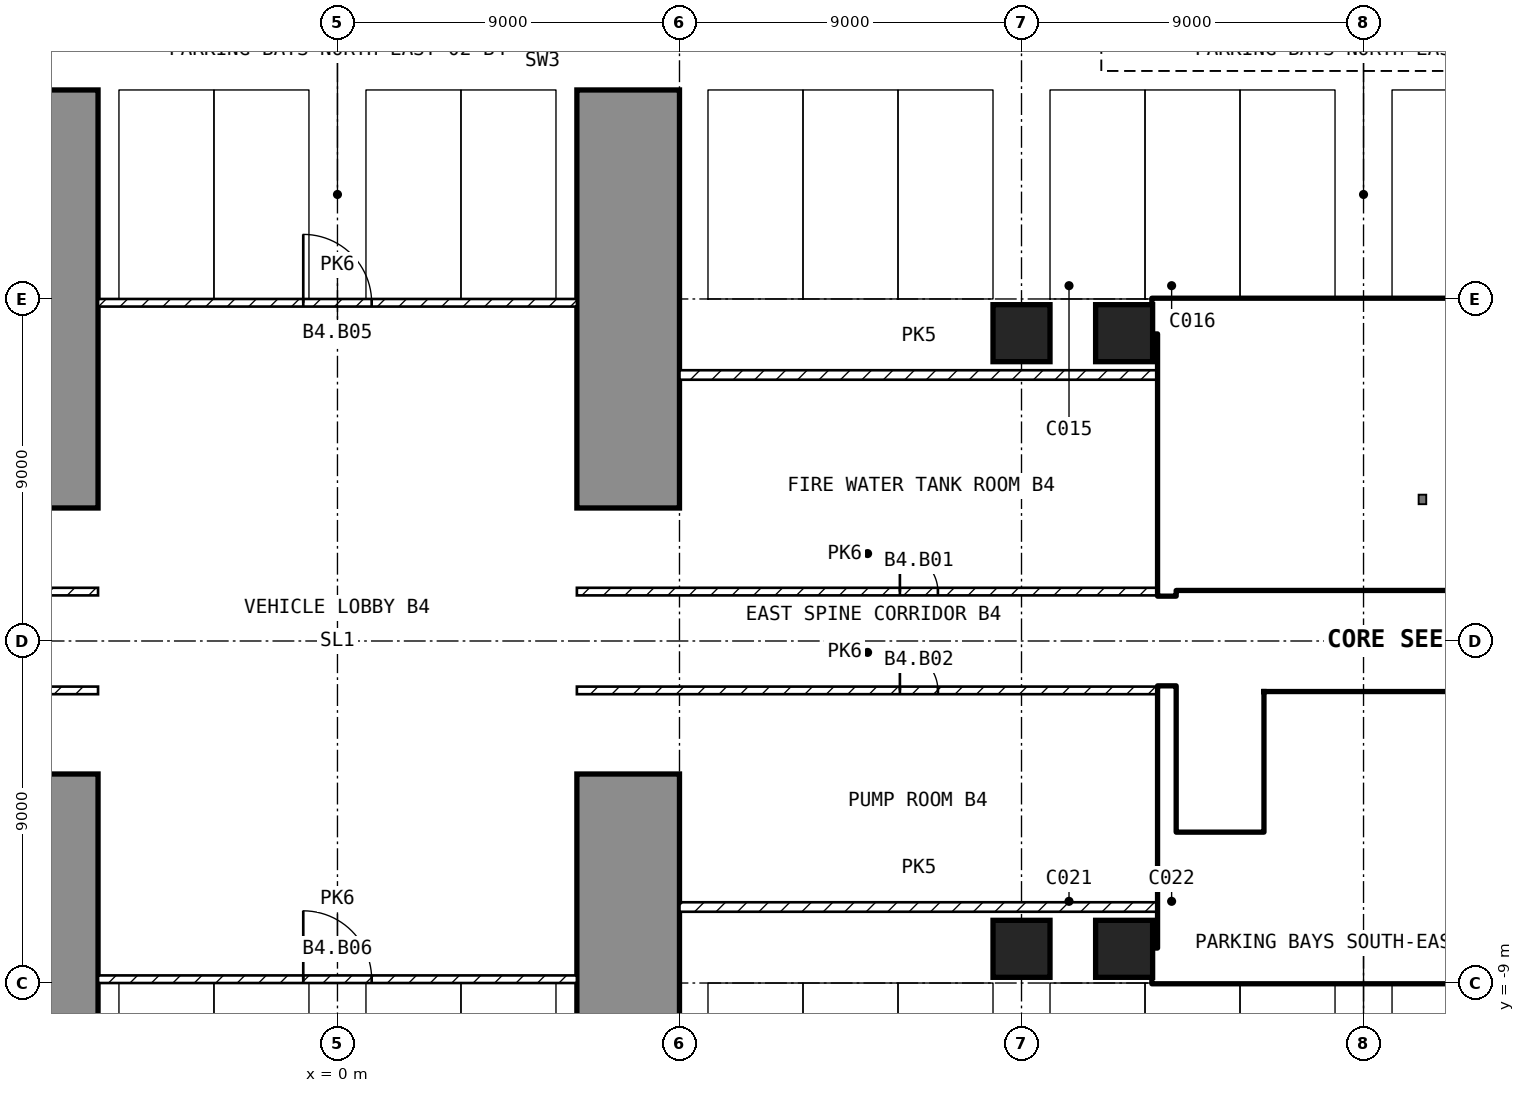
"""IFC4 building model, lengths in metres.
Left out: names, types, materials, properties, quantities, classifications, styles, units other than length and angle.
Written with IfcOpenShell. Run it as: python <this file> out.ifc"""

import sys

from ifc_helpers import new_model, si_unit, direction, frame, frame_2d, origin, origin_2d, place, context, subcontext, project, spatial, polyline, rectangle, outline, extrude, element, fill, save


model = new_model("IFC4")
c1 = context("Model", 3, precision=1e-05, world=origin(), true_north=direction((0.0, 1.0)))
c2 = subcontext(c1, "Body", "Model", "MODEL_VIEW")
j1 = project(units=[si_unit("LENGTHUNIT", "METRE"), si_unit("PLANEANGLEUNIT", "RADIAN")], contexts=[c1])
p1 = place(None, origin())
s1 = spatial("IfcSite", under=j1, at=p1, CompositionType="ELEMENT")
p2 = place(p1, origin())
s2 = spatial("IfcBuilding", under=s1, at=p2, CompositionType="ELEMENT")
p3 = place(p2, frame((0.0, 0.0, -17.1)))
s3 = spatial("IfcBuildingStorey", under=s2, at=p3, CompositionType="ELEMENT", Elevation=-17.1)
for number, where, z_axis, x_axis in (
    (1, (18.0, -8.1, 0.0), (0.0, 0.0, 1.0), (1.0, 0.0, 0.0)),
    (2, (18.0, 8.1, 0.0), (0.0, 0.0, 1.0), (1.0, 0.0, 0.0)),
    (3, (20.7, -8.1, 0.0), (0.0, 0.0, 1.0), (1.0, 0.0, 0.0)),
    (4, (20.7, 8.1, 0.0), (0.0, 0.0, 1.0), (1.0, 0.0, 0.0)),
):
    element("IfcColumn", number, at=place(p3, frame(where, z_axis=z_axis, x_axis=x_axis)), inside=s3, PredefinedType="COLUMN", context=c2, shape_type="SweptSolid", body=[
        extrude(rectangle(XDim=1.5, YDim=1.5, at=origin_2d()), origin(), (0.0, 0.0, 1.0), 3.9),
    ])
p4 = place(p3, frame((6.3, -27.0, 0.0), z_axis=(1.0, 0.0, 0.0), x_axis=(0.0, 1.0, 0.0)))
e5 = element("IfcWall", 5, at=p4, inside=s3, PredefinedType="SOLIDWALL", context=c2, shape_type="SweptSolid", body=[
    extrude(outline(polyline([(0.0, 0.0), (5.5, 0.0), (5.5, 3.0), (12.5, 3.0), (12.5, 0.0), (23.5, 0.0), (23.5, 3.9), (0.0, 3.9), (0.0, 0.0)])), origin(), (0.0, 0.0, 1.0), 2.7),
])
p5 = place(p3, frame((6.3, 3.5, 0.0), z_axis=(1.0, 0.0, 0.0), x_axis=(0.0, 1.0, 0.0)))
e6 = element("IfcWall", 6, at=p5, inside=s3, PredefinedType="SOLIDWALL", context=c2, shape_type="SweptSolid", body=[
    extrude(outline(polyline([(0.0, 0.0), (11.0, 0.0), (11.0, 3.0), (18.0, 3.0), (18.0, 0.0), (23.5, 0.0), (23.5, 3.9), (0.0, 3.9), (0.0, 0.0)])), origin(), (0.0, 0.0, 1.0), 2.7),
])
p6 = place(p3, frame((-9.0, -27.0, 0.0), z_axis=(1.0, 0.0, 0.0), x_axis=(0.0, 1.0, 0.0)))
e7 = element("IfcWall", 7, at=p6, inside=s3, PredefinedType="SOLIDWALL", context=c2, shape_type="SweptSolid", body=[
    extrude(outline(polyline([(0.0, 0.0), (5.5, 0.0), (5.5, 3.0), (12.5, 3.0), (12.5, 0.0), (23.5, 0.0), (23.5, 3.9), (0.0, 3.9), (0.0, 0.0)])), origin(), (0.0, 0.0, 1.0), 2.7),
])
p7 = place(p3, frame((-9.0, 3.5, 0.0), z_axis=(1.0, 0.0, 0.0), x_axis=(0.0, 1.0, 0.0)))
e8 = element("IfcWall", 8, at=p7, inside=s3, PredefinedType="SOLIDWALL", context=c2, shape_type="SweptSolid", body=[
    extrude(outline(polyline([(0.0, 0.0), (11.0, 0.0), (11.0, 3.0), (18.0, 3.0), (18.0, 0.0), (23.5, 0.0), (23.5, 3.9), (0.0, 3.9), (0.0, 0.0)])), origin(), (0.0, 0.0, 1.0), 2.7),
])
p8 = place(p3, frame((21.45, -8.55, 0.0), z_axis=(0.0, 0.0, 1.0), x_axis=(1.0, 0.0, 0.0)))
e9 = element("IfcWall", 9, at=p8, inside=s3, PredefinedType="SHEAR", context=c2, shape_type="SweptSolid", body=[
    extrude(rectangle(XDim=10.95, YDim=0.9, at=frame_2d((5.475, 0.0))), origin(), (0.0, 0.0, 1.0), 3.9),
])
p9 = place(p3, frame((21.45, 8.55, 0.0), z_axis=(0.0, 0.0, 1.0), x_axis=(1.0, 0.0, 0.0)))
e10 = element("IfcWall", 10, at=p9, inside=s3, PredefinedType="SHEAR", context=c2, shape_type="SweptSolid", body=[
    extrude(rectangle(XDim=10.05, YDim=0.9, at=frame_2d((5.025, 0.0))), origin(), (0.0, 0.0, 1.0), 3.9),
])
for number, where, z_axis, x_axis in (
    (11, (21.825, -8.1, 0.0), (0.0, 0.0, 1.0), (0.0, 1.0, 0.0)),
    (12, (21.825, 1.2, 0.0), (0.0, 0.0, 1.0), (0.0, 1.0, 0.0)),
):
    element("IfcWall", number, at=place(p3, frame(where, z_axis=z_axis, x_axis=x_axis)), inside=s3, PredefinedType="SHEAR", context=c2, shape_type="SweptSolid", body=[
        extrude(rectangle(XDim=6.9, YDim=0.45, at=frame_2d((3.45, 0.0))), origin(), (0.0, 0.0, 1.0), 3.9),
    ])
p10 = place(p3, frame((22.05, 1.45, 0.0), z_axis=(0.0, 0.0, 1.0), x_axis=(1.0, 0.0, 0.0)))
e13 = element("IfcWall", 13, at=p10, inside=s3, PredefinedType="SOLIDWALL", context=c2, shape_type="SweptSolid", body=[
    extrude(rectangle(XDim=13.05, YDim=0.2, at=frame_2d((6.525, 0.0))), origin(), (0.0, 0.0, 1.0), 3.9),
])
p11 = place(p10, frame((0.75, 0.0, 0.0)))
e14 = element("IfcOpeningElement", 14, at=p11, cuts=e13, PredefinedType="OPENING", context=c2, shape_type="SweptSolid", body=[
    extrude(rectangle(XDim=1.0, YDim=2.1, at=frame_2d((0.5, 1.05))), frame((0.0, 0.11, 0.0), z_axis=(0.0, -1.0, 0.0), x_axis=(1.0, 0.0, 0.0)), (0.0, 0.0, 1.0), 0.22),
])
p12 = place(p10, frame((3.25, 0.0, 0.0)))
e15 = element("IfcOpeningElement", 15, at=p12, cuts=e13, PredefinedType="OPENING", context=c2, shape_type="SweptSolid", body=[
    extrude(rectangle(XDim=1.0, YDim=2.1, at=frame_2d((0.5, 1.05))), frame((0.0, 0.11, 0.0), z_axis=(0.0, -1.0, 0.0), x_axis=(1.0, 0.0, 0.0)), (0.0, 0.0, 1.0), 0.22),
])
p13 = place(p10, frame((10.0, 0.0, 0.0)))
e16 = element("IfcOpeningElement", 16, at=p13, cuts=e13, PredefinedType="OPENING", context=c2, shape_type="SweptSolid", body=[
    extrude(rectangle(XDim=0.9, YDim=2.1, at=frame_2d((0.45, 1.05))), frame((0.0, 0.11, 0.0), z_axis=(0.0, -1.0, 0.0), x_axis=(1.0, 0.0, 0.0)), (0.0, 0.0, 1.0), 0.22),
])
p14 = place(p3, frame((24.5, -5.05, 0.0), z_axis=(0.0, 0.0, 1.0), x_axis=(0.0, 1.0, 0.0)))
e17 = element("IfcWall", 17, at=p14, inside=s3, PredefinedType="SOLIDWALL", context=c2, shape_type="SweptSolid", body=[
    extrude(rectangle(XDim=3.7, YDim=0.2, at=frame_2d((1.85, 0.0))), origin(), (0.0, 0.0, 1.0), 3.9),
])
p15 = place(p14, frame((0.1, 0.0, 0.0)))
e18 = element("IfcOpeningElement", 18, at=p15, cuts=e17, PredefinedType="OPENING", context=c2, shape_type="SweptSolid", body=[
    extrude(rectangle(XDim=0.8, YDim=2.1, at=frame_2d((0.4, 1.05))), frame((0.0, 0.11, 0.0), z_axis=(0.0, -1.0, 0.0), x_axis=(1.0, 0.0, 0.0)), (0.0, 0.0, 1.0), 0.22),
])
p16 = place(p3, frame((22.05, 5.15, 0.0), z_axis=(0.0, 0.0, 1.0), x_axis=(1.0, 0.0, 0.0)))
e19 = element("IfcWall", 19, at=p16, inside=s3, PredefinedType="SOLIDWALL", context=c2, shape_type="SweptSolid", body=[
    extrude(rectangle(XDim=6.3, YDim=0.2, at=frame_2d((3.15, 0.0))), origin(), (0.0, 0.0, 1.0), 3.9),
])
p17 = place(p16, frame((0.2, 0.0, 0.0)))
e20 = element("IfcOpeningElement", 20, at=p17, cuts=e19, PredefinedType="OPENING", context=c2, shape_type="SweptSolid", body=[
    extrude(rectangle(XDim=1.0, YDim=2.1, at=frame_2d((0.5, 1.05))), frame((0.0, 0.11, 0.0), z_axis=(0.0, -1.0, 0.0), x_axis=(1.0, 0.0, 0.0)), (0.0, 0.0, 1.0), 0.22),
])
p18 = place(p3, frame((22.05, -5.15, 0.0), z_axis=(0.0, 0.0, 1.0), x_axis=(1.0, 0.0, 0.0)))
e21 = element("IfcWall", 21, at=p18, inside=s3, PredefinedType="SOLIDWALL", context=c2, shape_type="SweptSolid", body=[
    extrude(rectangle(XDim=6.3, YDim=0.2, at=frame_2d((3.15, 0.0))), origin(), (0.0, 0.0, 1.0), 3.9),
])
p19 = place(p18, frame((0.2, 0.0, 0.0)))
e22 = element("IfcOpeningElement", 22, at=p19, cuts=e21, PredefinedType="OPENING", context=c2, shape_type="SweptSolid", body=[
    extrude(rectangle(XDim=1.0, YDim=2.1, at=frame_2d((0.5, 1.05))), frame((0.0, 0.11, 0.0), z_axis=(0.0, -1.0, 0.0), x_axis=(1.0, 0.0, 0.0)), (0.0, 0.0, 1.0), 0.22),
])
for number, where, z_axis, x_axis in (
    (23, (28.25, 5.25, 0.0), (0.0, 0.0, 1.0), (0.0, 1.0, 0.0)),
    (24, (28.25, -8.1, 0.0), (0.0, 0.0, 1.0), (0.0, 1.0, 0.0)),
):
    element("IfcWall", number, at=place(p3, frame(where, z_axis=z_axis, x_axis=x_axis)), inside=s3, PredefinedType="SOLIDWALL", context=c2, shape_type="SweptSolid", body=[
        extrude(rectangle(XDim=2.85, YDim=0.2, at=frame_2d((1.425, 0.0))), origin(), (0.0, 0.0, 1.0), 3.9),
    ])
p20 = place(p3, frame((24.6, -1.45, 0.0), z_axis=(0.0, 0.0, 1.0), x_axis=(1.0, 0.0, 0.0)))
e25 = element("IfcWall", 25, at=p20, inside=s3, PredefinedType="SOLIDWALL", context=c2, shape_type="SweptSolid", body=[
    extrude(rectangle(XDim=10.5, YDim=0.2, at=frame_2d((5.25, 0.0))), origin(), (0.0, 0.0, 1.0), 3.9),
])
p21 = place(p20, frame((2.45, 0.0, 0.0)))
e26 = element("IfcOpeningElement", 26, at=p21, cuts=e25, PredefinedType="OPENING", context=c2, shape_type="SweptSolid", body=[
    extrude(rectangle(XDim=0.9, YDim=2.1, at=frame_2d((0.45, 1.05))), frame((0.0, 0.11, 0.0), z_axis=(0.0, -1.0, 0.0), x_axis=(1.0, 0.0, 0.0)), (0.0, 0.0, 1.0), 0.22),
])
p22 = place(p20, frame((6.25, 0.0, 0.0)))
e27 = element("IfcOpeningElement", 27, at=p22, cuts=e25, PredefinedType="OPENING", context=c2, shape_type="SweptSolid", body=[
    extrude(rectangle(XDim=0.9, YDim=2.1, at=frame_2d((0.45, 1.05))), frame((0.0, 0.11, 0.0), z_axis=(0.0, -1.0, 0.0), x_axis=(1.0, 0.0, 0.0)), (0.0, 0.0, 1.0), 0.22),
])
p23 = place(p20, frame((8.575, 0.0, 0.0)))
e28 = element("IfcOpeningElement", 28, at=p23, cuts=e25, PredefinedType="OPENING", context=c2, shape_type="SweptSolid", body=[
    extrude(rectangle(XDim=0.9, YDim=2.1, at=frame_2d((0.45, 1.05))), frame((0.0, 0.11, 0.0), z_axis=(0.0, -1.0, 0.0), x_axis=(1.0, 0.0, 0.0)), (0.0, 0.0, 1.0), 0.22),
])
p24 = place(p3, frame((27.2, 3.95, 0.0), z_axis=(0.0, 0.0, 1.0), x_axis=(1.0, 0.0, 0.0)))
e29 = element("IfcWall", 29, at=p24, inside=s3, PredefinedType="SOLIDWALL", context=c2, shape_type="SweptSolid", body=[
    extrude(rectangle(XDim=7.9, YDim=0.2, at=frame_2d((3.95, 0.0))), origin(), (0.0, 0.0, 1.0), 3.9),
])
p25 = place(p3, frame((24.6, -3.95, 0.0), z_axis=(0.0, 0.0, 1.0), x_axis=(1.0, 0.0, 0.0)))
e30 = element("IfcWall", 30, at=p25, inside=s3, PredefinedType="SOLIDWALL", context=c2, shape_type="SweptSolid", body=[
    extrude(rectangle(XDim=10.5, YDim=0.2, at=frame_2d((5.25, 0.0))), origin(), (0.0, 0.0, 1.0), 3.9),
])
p26 = place(p3, frame((27.1, 1.55, 0.0), z_axis=(0.0, 0.0, 1.0), x_axis=(0.0, 1.0, 0.0)))
e31 = element("IfcWall", 31, at=p26, inside=s3, PredefinedType="SOLIDWALL", context=c2, shape_type="SweptSolid", body=[
    extrude(rectangle(XDim=3.5, YDim=0.2, at=frame_2d((1.75, 0.0))), origin(), (0.0, 0.0, 1.0), 3.9),
])
p27 = place(p26, frame((0.6, 0.0, 0.0)))
e32 = element("IfcOpeningElement", 32, at=p27, cuts=e31, PredefinedType="OPENING", context=c2, shape_type="SweptSolid", body=[
    extrude(rectangle(XDim=1.1, YDim=2.1, at=frame_2d((0.55, 1.05))), frame((0.0, 0.11, 0.0), z_axis=(0.0, -1.0, 0.0), x_axis=(1.0, 0.0, 0.0)), (0.0, 0.0, 1.0), 0.22),
])
p28 = place(p26, frame((2.6, 0.0, 0.0)))
e33 = element("IfcOpeningElement", 33, at=p28, cuts=e31, PredefinedType="OPENING", context=c2, shape_type="SweptSolid", body=[
    extrude(rectangle(XDim=0.8, YDim=2.1, at=frame_2d((0.4, 1.05))), frame((0.0, 0.11, 0.0), z_axis=(0.0, -1.0, 0.0), x_axis=(1.0, 0.0, 0.0)), (0.0, 0.0, 1.0), 0.22),
])
p29 = place(p3, frame((6.3, 1.3, 0.0), z_axis=(0.0, 0.0, 1.0), x_axis=(1.0, 0.0, 0.0)))
e34 = element("IfcWall", 34, at=p29, inside=s3, PredefinedType="PARTITIONING", context=c2, shape_type="SweptSolid", body=[
    extrude(rectangle(XDim=15.3, YDim=0.2, at=frame_2d((7.65, 0.0))), origin(), (0.0, 0.0, 1.0), 3.9),
])
p30 = place(p29, frame((8.5, 0.0, 0.0)))
e35 = element("IfcOpeningElement", 35, at=p30, cuts=e34, PredefinedType="OPENING", context=c2, shape_type="SweptSolid", body=[
    extrude(rectangle(XDim=1.0, YDim=2.1, at=frame_2d((0.5, 1.05))), frame((0.0, 0.11, 0.0), z_axis=(0.0, -1.0, 0.0), x_axis=(1.0, 0.0, 0.0)), (0.0, 0.0, 1.0), 0.22),
])
p31 = place(p3, frame((9.0, 7.0, 0.0), z_axis=(0.0, 0.0, 1.0), x_axis=(1.0, 0.0, 0.0)))
e36 = element("IfcWall", 36, at=p31, inside=s3, PredefinedType="SOLIDWALL", context=c2, shape_type="SweptSolid", body=[
    extrude(rectangle(XDim=12.6, YDim=0.25, at=frame_2d((6.3, 0.0))), origin(), (0.0, 0.0, 1.0), 3.9),
])
p32 = place(p3, frame((6.3, -1.3, 0.0), z_axis=(0.0, 0.0, 1.0), x_axis=(1.0, 0.0, 0.0)))
e37 = element("IfcWall", 37, at=p32, inside=s3, PredefinedType="PARTITIONING", context=c2, shape_type="SweptSolid", body=[
    extrude(rectangle(XDim=15.3, YDim=0.2, at=frame_2d((7.65, 0.0))), origin(), (0.0, 0.0, 1.0), 3.9),
])
p33 = place(p32, frame((8.5, 0.0, 0.0)))
e38 = element("IfcOpeningElement", 38, at=p33, cuts=e37, PredefinedType="OPENING", context=c2, shape_type="SweptSolid", body=[
    extrude(rectangle(XDim=1.0, YDim=2.1, at=frame_2d((0.5, 1.05))), frame((0.0, 0.11, 0.0), z_axis=(0.0, -1.0, 0.0), x_axis=(1.0, 0.0, 0.0)), (0.0, 0.0, 1.0), 0.22),
])
p34 = place(p3, frame((9.0, -7.0, 0.0), z_axis=(0.0, 0.0, 1.0), x_axis=(1.0, 0.0, 0.0)))
e39 = element("IfcWall", 39, at=p34, inside=s3, PredefinedType="SOLIDWALL", context=c2, shape_type="SweptSolid", body=[
    extrude(rectangle(XDim=12.6, YDim=0.25, at=frame_2d((6.3, 0.0))), origin(), (0.0, 0.0, 1.0), 3.9),
])
p35 = place(p3, frame((-6.3, 1.3, 0.0), z_axis=(0.0, 0.0, 1.0), x_axis=(-1.0, 0.0, 0.0)))
e40 = element("IfcWall", 40, at=p35, inside=s3, PredefinedType="PARTITIONING", context=c2, shape_type="SweptSolid", body=[
    extrude(rectangle(XDim=15.3, YDim=0.2, at=frame_2d((7.65, 0.0))), origin(), (0.0, 0.0, 1.0), 3.9),
])
p36 = place(p35, frame((8.5, 0.0, 0.0)))
e41 = element("IfcOpeningElement", 41, at=p36, cuts=e40, PredefinedType="OPENING", context=c2, shape_type="SweptSolid", body=[
    extrude(rectangle(XDim=1.0, YDim=2.1, at=frame_2d((0.5, 1.05))), frame((0.0, 0.11, 0.0), z_axis=(0.0, -1.0, 0.0), x_axis=(1.0, 0.0, 0.0)), (0.0, 0.0, 1.0), 0.22),
])
p37 = place(p3, frame((-6.3, -1.3, 0.0), z_axis=(0.0, 0.0, 1.0), x_axis=(-1.0, 0.0, 0.0)))
e42 = element("IfcWall", 42, at=p37, inside=s3, PredefinedType="PARTITIONING", context=c2, shape_type="SweptSolid", body=[
    extrude(rectangle(XDim=15.3, YDim=0.2, at=frame_2d((7.65, 0.0))), origin(), (0.0, 0.0, 1.0), 3.9),
])
p38 = place(p37, frame((8.5, 0.0, 0.0)))
e43 = element("IfcOpeningElement", 43, at=p38, cuts=e42, PredefinedType="OPENING", context=c2, shape_type="SweptSolid", body=[
    extrude(rectangle(XDim=1.0, YDim=2.1, at=frame_2d((0.5, 1.05))), frame((0.0, 0.11, 0.0), z_axis=(0.0, -1.0, 0.0), x_axis=(1.0, 0.0, 0.0)), (0.0, 0.0, 1.0), 0.22),
])
p39 = place(p3, frame((-6.3, 8.9, 0.0), z_axis=(0.0, 0.0, 1.0), x_axis=(1.0, 0.0, 0.0)))
e44 = element("IfcWall", 44, at=p39, inside=s3, PredefinedType="PARTITIONING", context=c2, shape_type="SweptSolid", body=[
    extrude(rectangle(XDim=12.6, YDim=0.2, at=frame_2d((6.3, 0.0))), origin(), (0.0, 0.0, 1.0), 3.9),
])
p40 = place(p39, frame((5.4, 0.0, 0.0)))
e45 = element("IfcOpeningElement", 45, at=p40, cuts=e44, PredefinedType="OPENING", context=c2, shape_type="SweptSolid", body=[
    extrude(rectangle(XDim=1.8, YDim=2.1, at=frame_2d((0.9, 1.05))), frame((0.0, 0.11, 0.0), z_axis=(0.0, -1.0, 0.0), x_axis=(1.0, 0.0, 0.0)), (0.0, 0.0, 1.0), 0.22),
])
p41 = place(p3, frame((-6.3, -8.9, 0.0), z_axis=(0.0, 0.0, 1.0), x_axis=(1.0, 0.0, 0.0)))
e46 = element("IfcWall", 46, at=p41, inside=s3, PredefinedType="PARTITIONING", context=c2, shape_type="SweptSolid", body=[
    extrude(rectangle(XDim=12.6, YDim=0.2, at=frame_2d((6.3, 0.0))), origin(), (0.0, 0.0, 1.0), 3.9),
])
p42 = place(p41, frame((5.4, 0.0, 0.0)))
e47 = element("IfcOpeningElement", 47, at=p42, cuts=e46, PredefinedType="OPENING", context=c2, shape_type="SweptSolid", body=[
    extrude(rectangle(XDim=1.8, YDim=2.1, at=frame_2d((0.9, 1.05))), frame((0.0, 0.11, 0.0), z_axis=(0.0, -1.0, 0.0), x_axis=(1.0, 0.0, 0.0)), (0.0, 0.0, 1.0), 0.22),
])
p43 = place(p27, origin())
e48 = element("IfcDoor", 48, at=p43, inside=s3, OperationType="DOUBLE_DOOR_SLIDING", PredefinedType="DOOR", context=c2, shape_type="SweptSolid", body=[
    extrude(rectangle(XDim=1.1, YDim=2.1, at=frame_2d((0.55, 1.05))), frame((0.0, 0.025, 0.0), z_axis=(0.0, -1.0, 0.0), x_axis=(1.0, 0.0, 0.0)), (0.0, 0.0, 1.0), 0.05),
])
fill(e32, e48)
p44 = place(p19, origin())
e49 = element("IfcDoor", 49, at=p44, inside=s3, OperationType="SINGLE_SWING_LEFT", PredefinedType="DOOR", context=c2, shape_type="SweptSolid", body=[
    extrude(rectangle(XDim=1.0, YDim=2.1, at=frame_2d((0.5, 1.05))), frame((0.0, 0.025, 0.0), z_axis=(0.0, -1.0, 0.0), x_axis=(1.0, 0.0, 0.0)), (0.0, 0.0, 1.0), 0.05),
])
fill(e22, e49)
p45 = place(p17, origin())
e50 = element("IfcDoor", 50, at=p45, inside=s3, OperationType="SINGLE_SWING_LEFT", PredefinedType="DOOR", context=c2, shape_type="SweptSolid", body=[
    extrude(rectangle(XDim=1.0, YDim=2.1, at=frame_2d((0.5, 1.05))), frame((0.0, 0.025, 0.0), z_axis=(0.0, -1.0, 0.0), x_axis=(1.0, 0.0, 0.0)), (0.0, 0.0, 1.0), 0.05),
])
fill(e20, e50)
p46 = place(p11, origin())
e51 = element("IfcDoor", 51, at=p46, inside=s3, OperationType="SINGLE_SWING_LEFT", PredefinedType="DOOR", context=c2, shape_type="SweptSolid", body=[
    extrude(rectangle(XDim=1.0, YDim=2.1, at=frame_2d((0.5, 1.05))), frame((0.0, 0.025, 0.0), z_axis=(0.0, -1.0, 0.0), x_axis=(1.0, 0.0, 0.0)), (0.0, 0.0, 1.0), 0.05),
])
fill(e14, e51)
p47 = place(p15, origin())
e52 = element("IfcDoor", 52, at=p47, inside=s3, OperationType="SINGLE_SWING_LEFT", PredefinedType="DOOR", context=c2, shape_type="SweptSolid", body=[
    extrude(rectangle(XDim=0.8, YDim=2.1, at=frame_2d((0.4, 1.05))), frame((0.0, 0.025, 0.0), z_axis=(0.0, -1.0, 0.0), x_axis=(1.0, 0.0, 0.0)), (0.0, 0.0, 1.0), 0.05),
])
fill(e18, e52)
p48 = place(p12, origin())
e53 = element("IfcDoor", 53, at=p48, inside=s3, OperationType="SINGLE_SWING_LEFT", PredefinedType="DOOR", context=c2, shape_type="SweptSolid", body=[
    extrude(rectangle(XDim=1.0, YDim=2.1, at=frame_2d((0.5, 1.05))), frame((0.0, 0.025, 0.0), z_axis=(0.0, -1.0, 0.0), x_axis=(1.0, 0.0, 0.0)), (0.0, 0.0, 1.0), 0.05),
])
fill(e15, e53)
p49 = place(p28, origin())
e54 = element("IfcDoor", 54, at=p49, inside=s3, OperationType="SINGLE_SWING_LEFT", PredefinedType="DOOR", context=c2, shape_type="SweptSolid", body=[
    extrude(rectangle(XDim=0.8, YDim=2.1, at=frame_2d((0.4, 1.05))), frame((0.0, 0.025, 0.0), z_axis=(0.0, -1.0, 0.0), x_axis=(1.0, 0.0, 0.0)), (0.0, 0.0, 1.0), 0.05),
])
fill(e33, e54)
p50 = place(p21, origin())
e55 = element("IfcDoor", 55, at=p50, inside=s3, OperationType="SINGLE_SWING_LEFT", PredefinedType="DOOR", context=c2, shape_type="SweptSolid", body=[
    extrude(rectangle(XDim=0.9, YDim=2.1, at=frame_2d((0.45, 1.05))), frame((0.0, 0.025, 0.0), z_axis=(0.0, -1.0, 0.0), x_axis=(1.0, 0.0, 0.0)), (0.0, 0.0, 1.0), 0.05),
])
fill(e26, e55)
p51 = place(p30, origin())
e56 = element("IfcDoor", 56, at=p51, inside=s3, OperationType="SINGLE_SWING_LEFT", PredefinedType="DOOR", context=c2, shape_type="SweptSolid", body=[
    extrude(rectangle(XDim=1.0, YDim=2.1, at=frame_2d((0.5, 1.05))), frame((0.0, 0.025, 0.0), z_axis=(0.0, -1.0, 0.0), x_axis=(1.0, 0.0, 0.0)), (0.0, 0.0, 1.0), 0.05),
])
fill(e35, e56)
p52 = place(p33, origin())
e57 = element("IfcDoor", 57, at=p52, inside=s3, OperationType="SINGLE_SWING_LEFT", PredefinedType="DOOR", context=c2, shape_type="SweptSolid", body=[
    extrude(rectangle(XDim=1.0, YDim=2.1, at=frame_2d((0.5, 1.05))), frame((0.0, 0.025, 0.0), z_axis=(0.0, -1.0, 0.0), x_axis=(1.0, 0.0, 0.0)), (0.0, 0.0, 1.0), 0.05),
])
fill(e38, e57)
p53 = place(p40, origin())
e58 = element("IfcDoor", 58, at=p53, inside=s3, OperationType="SINGLE_SWING_LEFT", PredefinedType="DOOR", context=c2, shape_type="SweptSolid", body=[
    extrude(rectangle(XDim=1.8, YDim=2.1, at=frame_2d((0.9, 1.05))), frame((0.0, 0.025, 0.0), z_axis=(0.0, -1.0, 0.0), x_axis=(1.0, 0.0, 0.0)), (0.0, 0.0, 1.0), 0.05),
])
fill(e45, e58)
p54 = place(p42, origin())
e59 = element("IfcDoor", 59, at=p54, inside=s3, OperationType="SINGLE_SWING_LEFT", PredefinedType="DOOR", context=c2, shape_type="SweptSolid", body=[
    extrude(rectangle(XDim=1.8, YDim=2.1, at=frame_2d((0.9, 1.05))), frame((0.0, 0.025, 0.0), z_axis=(0.0, -1.0, 0.0), x_axis=(1.0, 0.0, 0.0)), (0.0, 0.0, 1.0), 0.05),
])
fill(e47, e59)
save(model, sys.argv[1])
